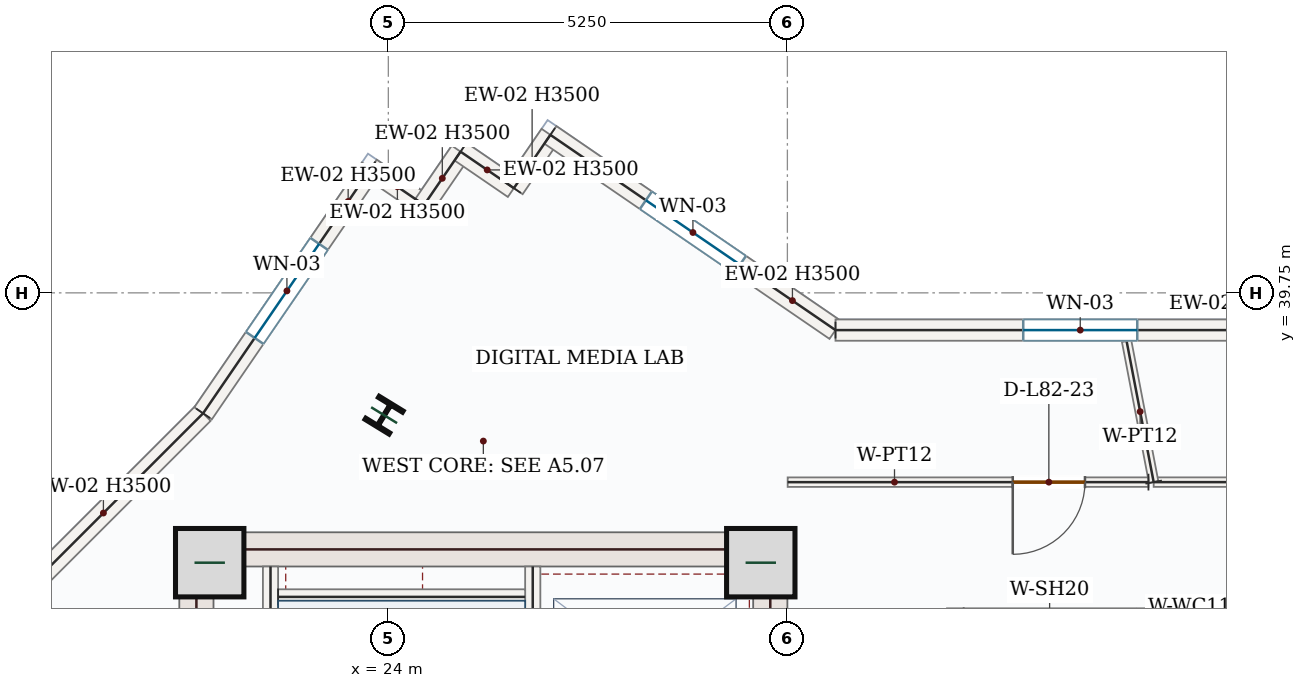
"""IFC4 building model, lengths in metres.
Left out: names, types, materials, properties, quantities, classifications, styles, units other than length and angle.
Written with IfcOpenShell. Run it as: python <this file> out.ifc"""

import sys

from ifc_helpers import new_model, si_unit, direction, frame, frame_2d, origin, origin_2d, place, context, subcontext, project, spatial, rectangle, i_section, extrude, source, transform, mapped, element, fill, save


model = new_model("IFC4")
c1 = context("Model", 3, precision=1e-05, world=origin(), true_north=direction((0.0, 1.0)))
c2 = subcontext(c1, "Body", "Model", "MODEL_VIEW")
j1 = project(units=[si_unit("LENGTHUNIT", "METRE"), si_unit("PLANEANGLEUNIT", "RADIAN")], contexts=[c1])
p1 = place(None, origin())
s1 = spatial("IfcSite", under=j1, at=p1, CompositionType="ELEMENT")
p2 = place(p1, origin())
s2 = spatial("IfcBuilding", under=s1, at=p2, CompositionType="ELEMENT")
p3 = place(p2, frame((0.0, 0.0, 338.55)))
s3 = spatial("IfcBuildingStorey", under=s2, at=p3, CompositionType="ELEMENT", Elevation=338.55)
m1 = source(origin(), c2, "Body", "SweptSolid", [
    extrude(rectangle(XDim=8.55, YDim=0.45, at=frame_2d((4.275, 0.0))), origin(), (0.0, 0.0, 1.0), 3.5),
])
p4 = place(p3, frame((21.475, 28.05, 0.0), z_axis=(0.0, 0.0, 1.0), x_axis=(0.0, 1.0, 0.0)))
e1 = element("IfcWall", 1, at=p4, inside=s3, PredefinedType="SHEAR", context=c2, shape_type="MappedRepresentation", body=[
    mapped(m1, transform((0.0, 0.0, 0.0), x_axis=(1.0, 0.0, 0.0), y_axis=(0.0, 1.0, 0.0), z_axis=(0.0, 0.0, 1.0), scale=1.0)),
])
p5 = place(p3, frame((29.025, 28.05, 0.0), z_axis=(0.0, 0.0, 1.0), x_axis=(0.0, 1.0, 0.0)))
e2 = element("IfcWall", 2, at=p5, inside=s3, PredefinedType="SHEAR", context=c2, shape_type="SweptSolid", body=[
    extrude(rectangle(XDim=8.55, YDim=0.45, at=frame_2d((4.275, 0.0))), origin(), (0.0, 0.0, 1.0), 3.5),
])
p6 = place(p5, frame((1.5, 0.0, 0.0)))
e3 = element("IfcOpeningElement", 3, at=p6, cuts=e2, PredefinedType="OPENING", context=c2, shape_type="SweptSolid", body=[
    extrude(rectangle(XDim=1.1, YDim=2.2, at=frame_2d((0.55, 1.1))), frame((0.0, 0.235, 0.0), z_axis=(0.0, -1.0, 0.0), x_axis=(1.0, 0.0, 0.0)), (0.0, 0.0, 1.0), 0.47),
])
m2 = source(origin(), c2, "Body", "SweptSolid", [
    extrude(rectangle(XDim=7.1, YDim=0.45, at=frame_2d((3.55, 0.0))), origin(), (0.0, 0.0, 1.0), 3.5),
])
p7 = place(p3, frame((21.7, 36.375, 0.0), z_axis=(0.0, 0.0, 1.0), x_axis=(1.0, 0.0, 0.0)))
e4 = element("IfcWall", 4, at=p7, inside=s3, PredefinedType="SHEAR", context=c2, shape_type="MappedRepresentation", body=[
    mapped(m2, transform((0.0, 0.0, 0.0), x_axis=(1.0, 0.0, 0.0), y_axis=(0.0, 1.0, 0.0), z_axis=(0.0, 0.0, 1.0), scale=1.0)),
])
m3 = source(origin(), c2, "Body", "SweptSolid", [
    extrude(rectangle(XDim=0.9, YDim=0.9, at=origin_2d()), origin(), (0.0, 0.0, 1.0), 3.75),
])
for number, where, z_axis, x_axis in (
    (5, (21.65, 36.2, 0.0), (0.0, 0.0, 1.0), (1.0, 0.0, 0.0)),
    (6, (28.9, 36.2, 0.0), (0.0, 0.0, 1.0), (1.0, 0.0, 0.0)),
):
    element("IfcColumn", number, at=place(p3, frame(where, z_axis=z_axis, x_axis=x_axis)), inside=s3, PredefinedType="COLUMN", context=c2, shape_type="MappedRepresentation", body=[
        mapped(m3, transform((0.0, 0.0, 0.0), x_axis=(1.0, 0.0, 0.0), y_axis=(0.0, 1.0, 0.0), z_axis=(0.0, 0.0, 1.0), scale=1.0)),
    ])
m4 = source(origin(), c2, "Body", "SweptSolid", [
    extrude(i_section(OverallWidth=0.369, OverallDepth=0.356, WebThickness=0.011, FlangeThickness=0.018, FilletRadius=0.018, at=origin_2d()), origin(), (0.0, 0.0, 1.0), 3.75),
])
p8 = place(p3, frame((23.945, 38.141, 0.0), z_axis=(0.0, 0.0, 1.0), x_axis=(-0.852640164354, 0.522498564716, 0.0)))
e7 = element("IfcColumn", 7, at=p8, inside=s3, PredefinedType="COLUMN", context=c2, shape_type="MappedRepresentation", body=[
    mapped(m4, transform((0.0, 0.0, 0.0), x_axis=(1.0, 0.0, 0.0), y_axis=(0.0, 1.0, 0.0), z_axis=(0.0, 0.0, 1.0), scale=1.0)),
])
m5 = source(origin(), c2, "Body", "SweptSolid", [
    extrude(rectangle(XDim=3.709, YDim=0.28, at=frame_2d((1.855, 0.0))), origin(), (0.0, 0.0, 1.0), 3.5),
])
p9 = place(p3, frame((18.94, 35.542, 0.0), z_axis=(0.0, 0.0, 1.0), x_axis=(0.707106781187, 0.707106781187, 0.0)))
e8 = element("IfcWall", 8, at=p9, inside=s3, PredefinedType="SOLIDWALL", context=c2, shape_type="MappedRepresentation", body=[
    mapped(m5, transform((0.0, 0.0, 0.0), x_axis=(1.0, 0.0, 0.0), y_axis=(0.0, 1.0, 0.0), z_axis=(0.0, 0.0, 1.0), scale=1.0)),
])
p10 = place(p3, frame((21.563, 38.165, 0.0), z_axis=(0.0, 0.0, 1.0), x_axis=(0.564961879511, 0.825117006672, 0.0)))
e9 = element("IfcWall", 9, at=p10, inside=s3, PredefinedType="SOLIDWALL", context=c2, shape_type="SweptSolid", body=[
    extrude(rectangle(XDim=3.904, YDim=0.28, at=frame_2d((1.952, 0.0))), origin(), (0.0, 0.0, 1.0), 3.5),
])
p11 = place(p10, frame((1.202, 0.0, 0.85)))
e10 = element("IfcOpeningElement", 10, at=p11, cuts=e9, PredefinedType="OPENING", context=c2, shape_type="SweptSolid", body=[
    extrude(rectangle(XDim=1.5, YDim=1.5, at=frame_2d((0.75, 0.75))), frame((0.0, 0.15, 0.0), z_axis=(0.0, -1.0, 0.0), x_axis=(1.0, 0.0, 0.0)), (0.0, 0.0, 1.0), 0.3),
])
m6 = source(origin(), c2, "Body", "SweptSolid", [
    extrude(rectangle(XDim=0.85, YDim=0.28, at=frame_2d((0.425, 0.0))), origin(), (0.0, 0.0, 1.0), 3.5),
])
for number, where, z_axis, x_axis in (
    (11, (23.769, 41.386, 0.0), (0.0, 0.0, 1.0), (0.825, -0.565, 0.0)),
    (12, (24.47, 40.906, 0.0), (0.0, 0.0, 1.0), (0.565, 0.825, 0.0)),
    (13, (24.95, 41.607, 0.0), (0.0, 0.0, 1.0), (0.825, -0.565, 0.0)),
    (14, (25.652, 41.127, 0.0), (0.0, 0.0, 1.0), (0.565, 0.825, 0.0)),
):
    element("IfcWall", number, at=place(p3, frame(where, z_axis=z_axis, x_axis=x_axis)), inside=s3, PredefinedType="SOLIDWALL", context=c2, shape_type="MappedRepresentation", body=[
        mapped(m6, transform((0.0, 0.0, 0.0), x_axis=(1.0, 0.0, 0.0), y_axis=(0.0, 1.0, 0.0), z_axis=(0.0, 0.0, 1.0), scale=1.0)),
    ])
p12 = place(p3, frame((26.132, 41.829, 0.0), z_axis=(0.0, 0.0, 1.0), x_axis=(0.825104362901, -0.564980345075, 0.0)))
e15 = element("IfcWall", 15, at=p12, inside=s3, PredefinedType="SOLIDWALL", context=c2, shape_type="SweptSolid", body=[
    extrude(rectangle(XDim=4.546, YDim=0.28, at=frame_2d((2.273, 0.0))), origin(), (0.0, 0.0, 1.0), 3.5),
])
p13 = place(p12, frame((1.523, 0.0, 0.85)))
e16 = element("IfcOpeningElement", 16, at=p13, cuts=e15, PredefinedType="OPENING", context=c2, shape_type="SweptSolid", body=[
    extrude(rectangle(XDim=1.5, YDim=1.5, at=frame_2d((0.75, 0.75))), frame((0.0, 0.15, 0.0), z_axis=(0.0, -1.0, 0.0), x_axis=(1.0, 0.0, 0.0)), (0.0, 0.0, 1.0), 0.3),
])
p14 = place(p3, frame((29.883, 39.26, 0.0), z_axis=(0.0, 0.0, 1.0), x_axis=(1.0, 0.0, 0.0)))
e17 = element("IfcWall", 17, at=p14, inside=s3, PredefinedType="SOLIDWALL", context=c2, shape_type="SweptSolid", body=[
    extrude(rectangle(XDim=6.44, YDim=0.28, at=frame_2d((3.22, 0.0))), origin(), (0.0, 0.0, 1.0), 3.5),
])
p15 = place(p14, frame((2.47, 0.0, 0.85)))
e18 = element("IfcOpeningElement", 18, at=p15, cuts=e17, PredefinedType="OPENING", context=c2, shape_type="SweptSolid", body=[
    extrude(rectangle(XDim=1.5, YDim=1.5, at=frame_2d((0.75, 0.75))), frame((0.0, 0.15, 0.0), z_axis=(0.0, -1.0, 0.0), x_axis=(1.0, 0.0, 0.0)), (0.0, 0.0, 1.0), 0.3),
])
m7 = source(origin(), c2, "Body", "SweptSolid", [
    extrude(rectangle(XDim=7.87, YDim=0.2, at=frame_2d((3.935, 0.0))), origin(), (0.0, 0.0, 1.0), 3.5),
])
p16 = place(p3, frame((22.45, 28.28, 0.0), z_axis=(0.0, 0.0, 1.0), x_axis=(0.0, 1.0, 0.0)))
e19 = element("IfcWall", 19, at=p16, inside=s3, PredefinedType="SOLIDWALL", context=c2, shape_type="MappedRepresentation", body=[
    mapped(m7, transform((0.0, 0.0, 0.0), x_axis=(1.0, 0.0, 0.0), y_axis=(0.0, 1.0, 0.0), z_axis=(0.0, 0.0, 1.0), scale=1.0)),
])
p17 = place(p3, frame((25.9, 28.15, 0.0), z_axis=(0.0, 0.0, 1.0), x_axis=(0.0, 1.0, 0.0)))
e20 = element("IfcWall", 20, at=p17, inside=s3, PredefinedType="SOLIDWALL", context=c2, shape_type="SweptSolid", body=[
    extrude(rectangle(XDim=8.0, YDim=0.2, at=frame_2d((4.0, 0.0))), origin(), (0.0, 0.0, 1.0), 3.5),
])
p18 = place(p17, frame((0.4, 0.0, 0.0)))
e21 = element("IfcOpeningElement", 21, at=p18, cuts=e20, PredefinedType="OPENING", context=c2, shape_type="SweptSolid", body=[
    extrude(rectangle(XDim=1.05, YDim=2.15, at=frame_2d((0.525, 1.075))), frame((0.0, 0.11, 0.0), z_axis=(0.0, -1.0, 0.0), x_axis=(1.0, 0.0, 0.0)), (0.0, 0.0, 1.0), 0.22),
])
m8 = source(origin(), c2, "Body", "SweptSolid", [
    extrude(rectangle(XDim=3.25, YDim=0.2, at=frame_2d((1.625, 0.0))), origin(), (0.0, 0.0, 1.0), 3.5),
])
p19 = place(p3, frame((22.55, 35.75, 0.0), z_axis=(0.0, 0.0, 1.0), x_axis=(1.0, 0.0, 0.0)))
e22 = element("IfcWall", 22, at=p19, inside=s3, PredefinedType="SOLIDWALL", context=c2, shape_type="MappedRepresentation", body=[
    mapped(m8, transform((0.0, 0.0, 0.0), x_axis=(1.0, 0.0, 0.0), y_axis=(0.0, 1.0, 0.0), z_axis=(0.0, 0.0, 1.0), scale=1.0)),
])
p20 = place(p3, frame((31.45, 33.2, 0.0), z_axis=(0.0, 0.0, 1.0), x_axis=(0.0, 1.0, 0.0)))
e23 = element("IfcWall", 23, at=p20, inside=s3, PredefinedType="SOLIDWALL", context=c2, shape_type="SweptSolid", body=[
    extrude(rectangle(XDim=2.4, YDim=0.2, at=frame_2d((1.2, 0.0))), origin(), (0.0, 0.0, 1.0), 3.5),
])
p21 = place(p20, frame((0.65, 0.0, 0.0)))
e24 = element("IfcOpeningElement", 24, at=p21, cuts=e23, PredefinedType="OPENING", context=c2, shape_type="SweptSolid", body=[
    extrude(rectangle(XDim=1.1, YDim=2.15, at=frame_2d((0.55, 1.075))), frame((0.0, 0.11, 0.0), z_axis=(0.0, -1.0, 0.0), x_axis=(1.0, 0.0, 0.0)), (0.0, 0.0, 1.0), 0.22),
])
m9 = source(origin(), c2, "Body", "SweptSolid", [
    extrude(rectangle(XDim=2.4, YDim=0.2, at=frame_2d((1.2, 0.0))), origin(), (0.0, 0.0, 1.0), 3.5),
])
p22 = place(p3, frame((33.95, 33.2, 0.0), z_axis=(0.0, 0.0, 1.0), x_axis=(0.0, 1.0, 0.0)))
e25 = element("IfcWall", 25, at=p22, inside=s3, PredefinedType="SOLIDWALL", context=c2, shape_type="MappedRepresentation", body=[
    mapped(m9, transform((0.0, 0.0, 0.0), x_axis=(1.0, 0.0, 0.0), y_axis=(0.0, 1.0, 0.0), z_axis=(0.0, 0.0, 1.0), scale=1.0)),
])
p23 = place(p3, frame((39.765, 37.26, 0.0), z_axis=(0.0, 0.0, 1.0), x_axis=(-1.0, 0.0, 0.0)))
e26 = element("IfcWall", 26, at=p23, inside=s3, PredefinedType="PARTITIONING", context=c2, shape_type="SweptSolid", body=[
    extrude(rectangle(XDim=5.696, YDim=0.125, at=frame_2d((2.848, 0.0))), origin(), (0.0, 0.0, 1.0), 3.5),
])
p24 = place(p23, frame((3.085, 0.0, 0.0)))
e27 = element("IfcOpeningElement", 27, at=p24, cuts=e26, PredefinedType="OPENING", context=c2, shape_type="SweptSolid", body=[
    extrude(rectangle(XDim=0.95, YDim=2.15, at=frame_2d((0.475, 1.075))), frame((0.0, 0.073, 0.0), z_axis=(0.0, -1.0, 0.0), x_axis=(1.0, 0.0, 0.0)), (0.0, 0.0, 1.0), 0.145),
])
m10 = source(origin(), c2, "Body", "SweptSolid", [
    extrude(rectangle(XDim=1.889, YDim=0.125, at=frame_2d((0.944, 0.0))), origin(), (0.0, 0.0, 1.0), 3.5),
])
p25 = place(p3, frame((34.069, 37.26, 0.0), z_axis=(0.0, 0.0, 1.0), x_axis=(-0.188454265316, 0.982081966989, 0.0)))
e28 = element("IfcWall", 28, at=p25, inside=s3, PredefinedType="PARTITIONING", context=c2, shape_type="MappedRepresentation", body=[
    mapped(m10, transform((0.0, 0.0, 0.0), x_axis=(1.0, 0.0, 0.0), y_axis=(0.0, 1.0, 0.0), z_axis=(0.0, 0.0, 1.0), scale=1.0)),
])
p26 = place(p3, frame((34.0, 37.26, 0.0), z_axis=(0.0, 0.0, 1.0), x_axis=(-0.999999994709, -0.000102870075, 0.0)))
e29 = element("IfcWall", 29, at=p26, inside=s3, PredefinedType="PARTITIONING", context=c2, shape_type="SweptSolid", body=[
    extrude(rectangle(XDim=4.747, YDim=0.125, at=frame_2d((2.373, 0.0))), origin(), (0.0, 0.0, 1.0), 3.5),
])
p27 = place(p26, frame((0.835, 0.0, 0.0)))
e30 = element("IfcOpeningElement", 30, at=p27, cuts=e29, PredefinedType="OPENING", context=c2, shape_type="SweptSolid", body=[
    extrude(rectangle(XDim=0.95, YDim=2.15, at=frame_2d((0.475, 1.075))), frame((0.0, 0.073, 0.0), z_axis=(0.0, -1.0, 0.0), x_axis=(1.0, 0.0, 0.0)), (0.0, 0.0, 1.0), 0.145),
])
m11 = source(origin(), c2, "Body", "SweptSolid", [
    extrude(rectangle(XDim=1.5, YDim=1.5, at=frame_2d((0.75, 0.75))), frame((0.0, 0.03, 0.0), z_axis=(0.0, -1.0, 0.0), x_axis=(1.0, 0.0, 0.0)), (0.0, 0.0, 1.0), 0.06),
])
p28 = place(p11, origin())
e31 = element("IfcWindow", 31, at=p28, inside=s3, PartitioningType="SINGLE_PANEL", PredefinedType="WINDOW", context=c2, shape_type="MappedRepresentation", body=[
    mapped(m11, transform((0.0, 0.0, 0.0), x_axis=(1.0, 0.0, 0.0), y_axis=(0.0, 1.0, 0.0), z_axis=(0.0, 0.0, 1.0), scale=1.0)),
])
fill(e10, e31)
p29 = place(p13, origin())
e32 = element("IfcWindow", 32, at=p29, inside=s3, PartitioningType="SINGLE_PANEL", PredefinedType="WINDOW", context=c2, shape_type="MappedRepresentation", body=[
    mapped(m11, transform((0.0, 0.0, 0.0), x_axis=(1.0, 0.0, 0.0), y_axis=(0.0, 1.0, 0.0), z_axis=(0.0, 0.0, 1.0), scale=1.0)),
])
fill(e16, e32)
p30 = place(p15, origin())
e33 = element("IfcWindow", 33, at=p30, inside=s3, PartitioningType="SINGLE_PANEL", PredefinedType="WINDOW", context=c2, shape_type="MappedRepresentation", body=[
    mapped(m11, transform((0.0, 0.0, 0.0), x_axis=(1.0, 0.0, 0.0), y_axis=(0.0, 1.0, 0.0), z_axis=(0.0, 0.0, 1.0), scale=1.0)),
])
fill(e18, e33)
m12 = source(origin(), c2, "Body", "SweptSolid", [
    extrude(rectangle(XDim=0.95, YDim=2.15, at=frame_2d((0.475, 1.075))), frame((0.0, 0.025, 0.0), z_axis=(0.0, -1.0, 0.0), x_axis=(1.0, 0.0, 0.0)), (0.0, 0.0, 1.0), 0.05),
])
p31 = place(p27, origin())
e34 = element("IfcDoor", 34, at=p31, inside=s3, OperationType="SINGLE_SWING_RIGHT", PredefinedType="DOOR", context=c2, shape_type="MappedRepresentation", body=[
    mapped(m12, transform((0.0, 0.0, 0.0), x_axis=(1.0, 0.0, 0.0), y_axis=(0.0, 1.0, 0.0), z_axis=(0.0, 0.0, 1.0), scale=1.0)),
])
fill(e30, e34)
save(model, sys.argv[1])
